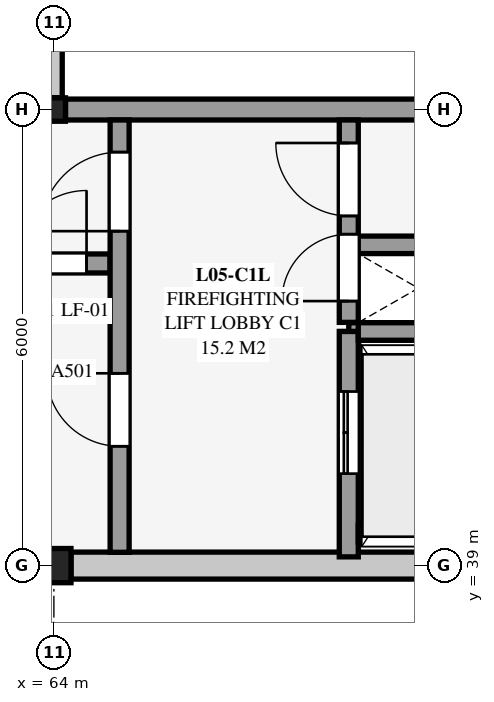
"""IFC4 building model, lengths in metres.
Left out: names, types, materials, properties, quantities, classifications, styles, units other than length and angle.
Written with IfcOpenShell. Run it as: python <this file> out.ifc"""

import sys

from ifc_helpers import new_model, si_unit, direction, frame, frame_2d, origin, origin_2d, place, context, subcontext, project, spatial, rectangle, i_section, extrude, element, fill, save


model = new_model("IFC4")
c1 = context("Model", 3, precision=1e-05, world=origin(), true_north=direction((0.0, 1.0)))
c2 = subcontext(c1, "Body", "Model", "MODEL_VIEW")
j1 = project(units=[si_unit("LENGTHUNIT", "METRE"), si_unit("PLANEANGLEUNIT", "RADIAN")], contexts=[c1])
p1 = place(None, origin())
s1 = spatial("IfcSite", under=j1, at=p1, CompositionType="ELEMENT")
p2 = place(p1, origin())
s2 = spatial("IfcBuilding", under=s1, at=p2, CompositionType="ELEMENT")
p3 = place(p2, frame((0.0, 0.0, 18.0)))
s3 = spatial("IfcBuildingStorey", under=s2, at=p3, CompositionType="ELEMENT", Elevation=18.0)
p4 = place(p3, frame((64.0, 39.0, 0.0), z_axis=(0.0, 0.0, 1.0), x_axis=(1.0, 0.0, 0.0)))
e1 = element("IfcColumn", 1, at=p4, inside=s3, PredefinedType="COLUMN", context=c2, shape_type="SweptSolid", body=[
    extrude(rectangle(XDim=0.45, YDim=0.45, at=origin_2d()), origin(), (0.0, 0.0, 1.0), 4.5),
])
p5 = place(p3, frame((64.0, 45.0, 0.0), z_axis=(0.0, 0.0, 1.0), x_axis=(1.0, 0.0, 0.0)))
e2 = element("IfcColumn", 2, at=p5, inside=s3, PredefinedType="COLUMN", context=c2, shape_type="SweptSolid", body=[
    extrude(i_section(OverallWidth=0.305, OverallDepth=0.308, WebThickness=0.01, FlangeThickness=0.015, at=origin_2d()), origin(), (0.0, 0.0, 1.0), 4.5),
])
p6 = place(p3, frame((69.775, 39.0, 0.0), z_axis=(0.0, 0.0, 1.0), x_axis=(-1.0, 0.0, 0.0)))
e3 = element("IfcWall", 3, at=p6, inside=s3, PredefinedType="SOLIDWALL", context=c2, shape_type="SweptSolid", body=[
    extrude(rectangle(XDim=5.55, YDim=0.355, at=frame_2d((2.775, 0.0))), origin(), (0.0, 0.0, 1.0), 4.234),
])
for number, where, z_axis, x_axis in (
    (4, (67.88, 39.42, 4.5), (0.0, 0.0, 1.0), (1.0, 0.0, 0.0)),
    (5, (69.7, 42.08, 4.5), (0.0, 0.0, 1.0), (-1.0, 0.0, 0.0)),
):
    element("IfcWall", number, at=place(p3, frame(where, z_axis=z_axis, x_axis=x_axis)), inside=s3, PredefinedType="SHEAR", context=c2, shape_type="SweptSolid", body=[
        extrude(rectangle(XDim=1.82, YDim=0.23, at=frame_2d((0.91, 0.0))), origin(), (0.0, 0.0, 1.0), 1.25),
    ])
p7 = place(p3, frame((67.88, 42.08, 4.5), z_axis=(0.0, 0.0, 1.0), x_axis=(0.0, -1.0, 0.0)))
e6 = element("IfcWall", 6, at=p7, inside=s3, PredefinedType="SHEAR", context=c2, shape_type="SweptSolid", body=[
    extrude(rectangle(XDim=2.66, YDim=0.23, at=frame_2d((1.33, 0.0))), origin(), (0.0, 0.0, 1.0), 1.25),
])
p8 = place(p3, frame((64.153, 45.0, 0.0), z_axis=(0.0, 0.0, 1.0), x_axis=(1.0, 0.0, 0.0)))
e7 = element("IfcWall", 7, at=p8, inside=s3, PredefinedType="SHEAR", context=c2, shape_type="SweptSolid", body=[
    extrude(rectangle(XDim=5.695, YDim=0.275, at=frame_2d((2.847, 0.0))), origin(), (0.0, 0.0, 1.0), 4.24),
])
p9 = place(p3, frame((63.16, 42.975, 0.0), z_axis=(0.0, 0.0, 1.0), x_axis=(1.0, 0.0, 0.0)))
e8 = element("IfcWall", 8, at=p9, inside=s3, PredefinedType="SHEAR", context=c2, shape_type="SweptSolid", body=[
    extrude(rectangle(XDim=1.58, YDim=0.25, at=frame_2d((0.79, 0.0))), origin(), (0.0, 0.0, 1.0), 4.24),
])
p10 = place(p9, frame((0.31, 0.0, 0.0)))
e9 = element("IfcOpeningElement", 9, at=p10, cuts=e8, PredefinedType="OPENING", context=c2, shape_type="SweptSolid", body=[
    extrude(rectangle(XDim=0.96, YDim=2.12, at=frame_2d((0.48, 1.06))), frame((0.0, 0.135, 0.0), z_axis=(0.0, -1.0, 0.0), x_axis=(1.0, 0.0, 0.0)), (0.0, 0.0, 1.0), 0.27),
])
p11 = place(p3, frame((64.865, 39.175, 0.0), z_axis=(0.0, 0.0, 1.0), x_axis=(0.0, 1.0, 0.0)))
e10 = element("IfcWall", 10, at=p11, inside=s3, PredefinedType="SHEAR", context=c2, shape_type="SweptSolid", body=[
    extrude(rectangle(XDim=5.688, YDim=0.25, at=frame_2d((2.844, 0.0))), origin(), (0.0, 0.0, 1.0), 4.24),
])
p12 = place(p11, frame((4.225, 0.0, 0.0)))
e11 = element("IfcOpeningElement", 11, at=p12, cuts=e10, PredefinedType="OPENING", context=c2, shape_type="SweptSolid", body=[
    extrude(rectangle(XDim=1.04, YDim=2.14, at=frame_2d((0.52, 1.07))), frame((0.0, 0.135, 0.0), z_axis=(0.0, -1.0, 0.0), x_axis=(1.0, 0.0, 0.0)), (0.0, 0.0, 1.0), 0.27),
])
p13 = place(p11, frame((1.395, 0.0, 0.0)))
e12 = element("IfcOpeningElement", 12, at=p13, cuts=e10, PredefinedType="OPENING", context=c2, shape_type="SweptSolid", body=[
    extrude(rectangle(XDim=0.96, YDim=2.12, at=frame_2d((0.48, 1.06))), frame((0.0, 0.135, 0.0), z_axis=(0.0, -1.0, 0.0), x_axis=(1.0, 0.0, 0.0)), (0.0, 0.0, 1.0), 0.27),
])
p14 = place(p3, frame((67.88, 39.115, 0.0), z_axis=(0.0, 0.0, 1.0), x_axis=(0.0, 1.0, 0.0)))
e13 = element("IfcWall", 13, at=p14, inside=s3, PredefinedType="SHEAR", context=c2, shape_type="SweptSolid", body=[
    extrude(rectangle(XDim=2.965, YDim=0.25, at=frame_2d((1.482, 0.0))), origin(), (0.0, 0.0, 1.0), 4.5),
])
p15 = place(p14, frame((1.095, 0.0, 0.0)))
e14 = element("IfcOpeningElement", 14, at=p15, cuts=e13, PredefinedType="OPENING", context=c2, shape_type="SweptSolid", body=[
    extrude(rectangle(XDim=1.08, YDim=2.15, at=frame_2d((0.54, 1.075))), frame((0.0, 0.135, 0.0), z_axis=(0.0, -1.0, 0.0), x_axis=(1.0, 0.0, 0.0)), (0.0, 0.0, 1.0), 0.27),
])
for number, where, z_axis, x_axis in (
    (15, (68.005, 39.42, 0.0), (0.0, 0.0, 1.0), (1.0, 0.0, 0.0)),
    (16, (68.005, 42.08, 0.0), (0.0, 0.0, 1.0), (1.0, 0.0, 0.0)),
):
    element("IfcWall", number, at=place(p3, frame(where, z_axis=z_axis, x_axis=x_axis)), inside=s3, PredefinedType="SHEAR", context=c2, shape_type="SweptSolid", body=[
        extrude(rectangle(XDim=1.58, YDim=0.23, at=frame_2d((0.79, 0.0))), origin(), (0.0, 0.0, 1.0), 4.5),
    ])
p16 = place(p3, frame((67.88, 42.2, 0.0), z_axis=(0.0, 0.0, 1.0), x_axis=(0.0, 1.0, 0.0)))
e17 = element("IfcWall", 17, at=p16, inside=s3, PredefinedType="SHEAR", context=c2, shape_type="SweptSolid", body=[
    extrude(rectangle(XDim=2.663, YDim=0.25, at=frame_2d((1.331, 0.0))), origin(), (0.0, 0.0, 1.0), 4.24),
])
p17 = place(p16, frame((0.28, 0.0, 0.0)))
e18 = element("IfcOpeningElement", 18, at=p17, cuts=e17, PredefinedType="OPENING", context=c2, shape_type="SweptSolid", body=[
    extrude(rectangle(XDim=0.88, YDim=2.08, at=frame_2d((0.44, 1.04))), frame((0.0, 0.135, 0.0), z_axis=(0.0, -1.0, 0.0), x_axis=(1.0, 0.0, 0.0)), (0.0, 0.0, 1.0), 0.27),
])
p18 = place(p16, frame((1.4, 0.0, 0.0)))
e19 = element("IfcOpeningElement", 19, at=p18, cuts=e17, PredefinedType="OPENING", context=c2, shape_type="SweptSolid", body=[
    extrude(rectangle(XDim=0.96, YDim=2.12, at=frame_2d((0.48, 1.06))), frame((0.0, 0.135, 0.0), z_axis=(0.0, -1.0, 0.0), x_axis=(1.0, 0.0, 0.0)), (0.0, 0.0, 1.0), 0.27),
])
p19 = place(p3, frame((68.005, 43.22, 0.0), z_axis=(0.0, 0.0, 1.0), x_axis=(1.0, 0.0, 0.0)))
e20 = element("IfcWall", 20, at=p19, inside=s3, PredefinedType="SHEAR", context=c2, shape_type="SweptSolid", body=[
    extrude(rectangle(XDim=1.858, YDim=0.23, at=frame_2d((0.929, 0.0))), origin(), (0.0, 0.0, 1.0), 4.24),
])
p20 = place(p3, frame((64.0, 45.156, 0.0), z_axis=(0.0, 0.0, 1.0), x_axis=(0.0, 1.0, 0.0)))
e21 = element("IfcWall", 21, at=p20, inside=s3, PredefinedType="SOLIDWALL", context=c2, shape_type="SweptSolid", body=[
    extrude(rectangle(XDim=5.617, YDim=0.22, at=frame_2d((2.809, 0.0))), origin(), (0.0, 0.0, 1.0), 3.892),
])
p21 = place(p10, origin())
e22 = element("IfcDoor", 22, at=p21, inside=s3, OperationType="SINGLE_SWING_RIGHT", PredefinedType="DOOR", context=c2, shape_type="SweptSolid", body=[
    extrude(rectangle(XDim=0.96, YDim=2.12, at=frame_2d((0.48, 1.06))), frame((0.0, 0.025, 0.0), z_axis=(0.0, -1.0, 0.0), x_axis=(1.0, 0.0, 0.0)), (0.0, 0.0, 1.0), 0.05),
])
fill(e9, e22)
p22 = place(p12, origin())
e23 = element("IfcDoor", 23, at=p22, inside=s3, OperationType="SINGLE_SWING_LEFT", PredefinedType="DOOR", context=c2, shape_type="SweptSolid", body=[
    extrude(rectangle(XDim=1.04, YDim=2.14, at=frame_2d((0.52, 1.07))), frame((0.0, 0.025, 0.0), z_axis=(0.0, -1.0, 0.0), x_axis=(1.0, 0.0, 0.0)), (0.0, 0.0, 1.0), 0.05),
])
fill(e11, e23)
p23 = place(p13, origin())
e24 = element("IfcDoor", 24, at=p23, inside=s3, OperationType="SINGLE_SWING_RIGHT", PredefinedType="DOOR", context=c2, shape_type="SweptSolid", body=[
    extrude(rectangle(XDim=0.96, YDim=2.12, at=frame_2d((0.48, 1.06))), frame((0.0, 0.025, 0.0), z_axis=(0.0, -1.0, 0.0), x_axis=(1.0, 0.0, 0.0)), (0.0, 0.0, 1.0), 0.05),
])
fill(e12, e24)
p24 = place(p15, origin())
e25 = element("IfcDoor", 25, at=p24, inside=s3, OperationType="DOUBLE_DOOR_SLIDING", PredefinedType="DOOR", context=c2, shape_type="SweptSolid", body=[
    extrude(rectangle(XDim=1.08, YDim=2.15, at=frame_2d((0.54, 1.075))), frame((0.0, 0.025, 0.0), z_axis=(0.0, -1.0, 0.0), x_axis=(1.0, 0.0, 0.0)), (0.0, 0.0, 1.0), 0.05),
])
fill(e14, e25)
p25 = place(p17, origin())
e26 = element("IfcDoor", 26, at=p25, inside=s3, OperationType="SINGLE_SWING_LEFT", PredefinedType="DOOR", context=c2, shape_type="SweptSolid", body=[
    extrude(rectangle(XDim=0.88, YDim=2.08, at=frame_2d((0.44, 1.04))), frame((0.0, 0.025, 0.0), z_axis=(0.0, -1.0, 0.0), x_axis=(1.0, 0.0, 0.0)), (0.0, 0.0, 1.0), 0.05),
])
fill(e18, e26)
p26 = place(p18, origin())
e27 = element("IfcDoor", 27, at=p26, inside=s3, OperationType="SINGLE_SWING_RIGHT", PredefinedType="DOOR", context=c2, shape_type="SweptSolid", body=[
    extrude(rectangle(XDim=0.96, YDim=2.12, at=frame_2d((0.48, 1.06))), frame((0.0, 0.025, 0.0), z_axis=(0.0, -1.0, 0.0), x_axis=(1.0, 0.0, 0.0)), (0.0, 0.0, 1.0), 0.05),
])
fill(e19, e27)
save(model, sys.argv[1])
